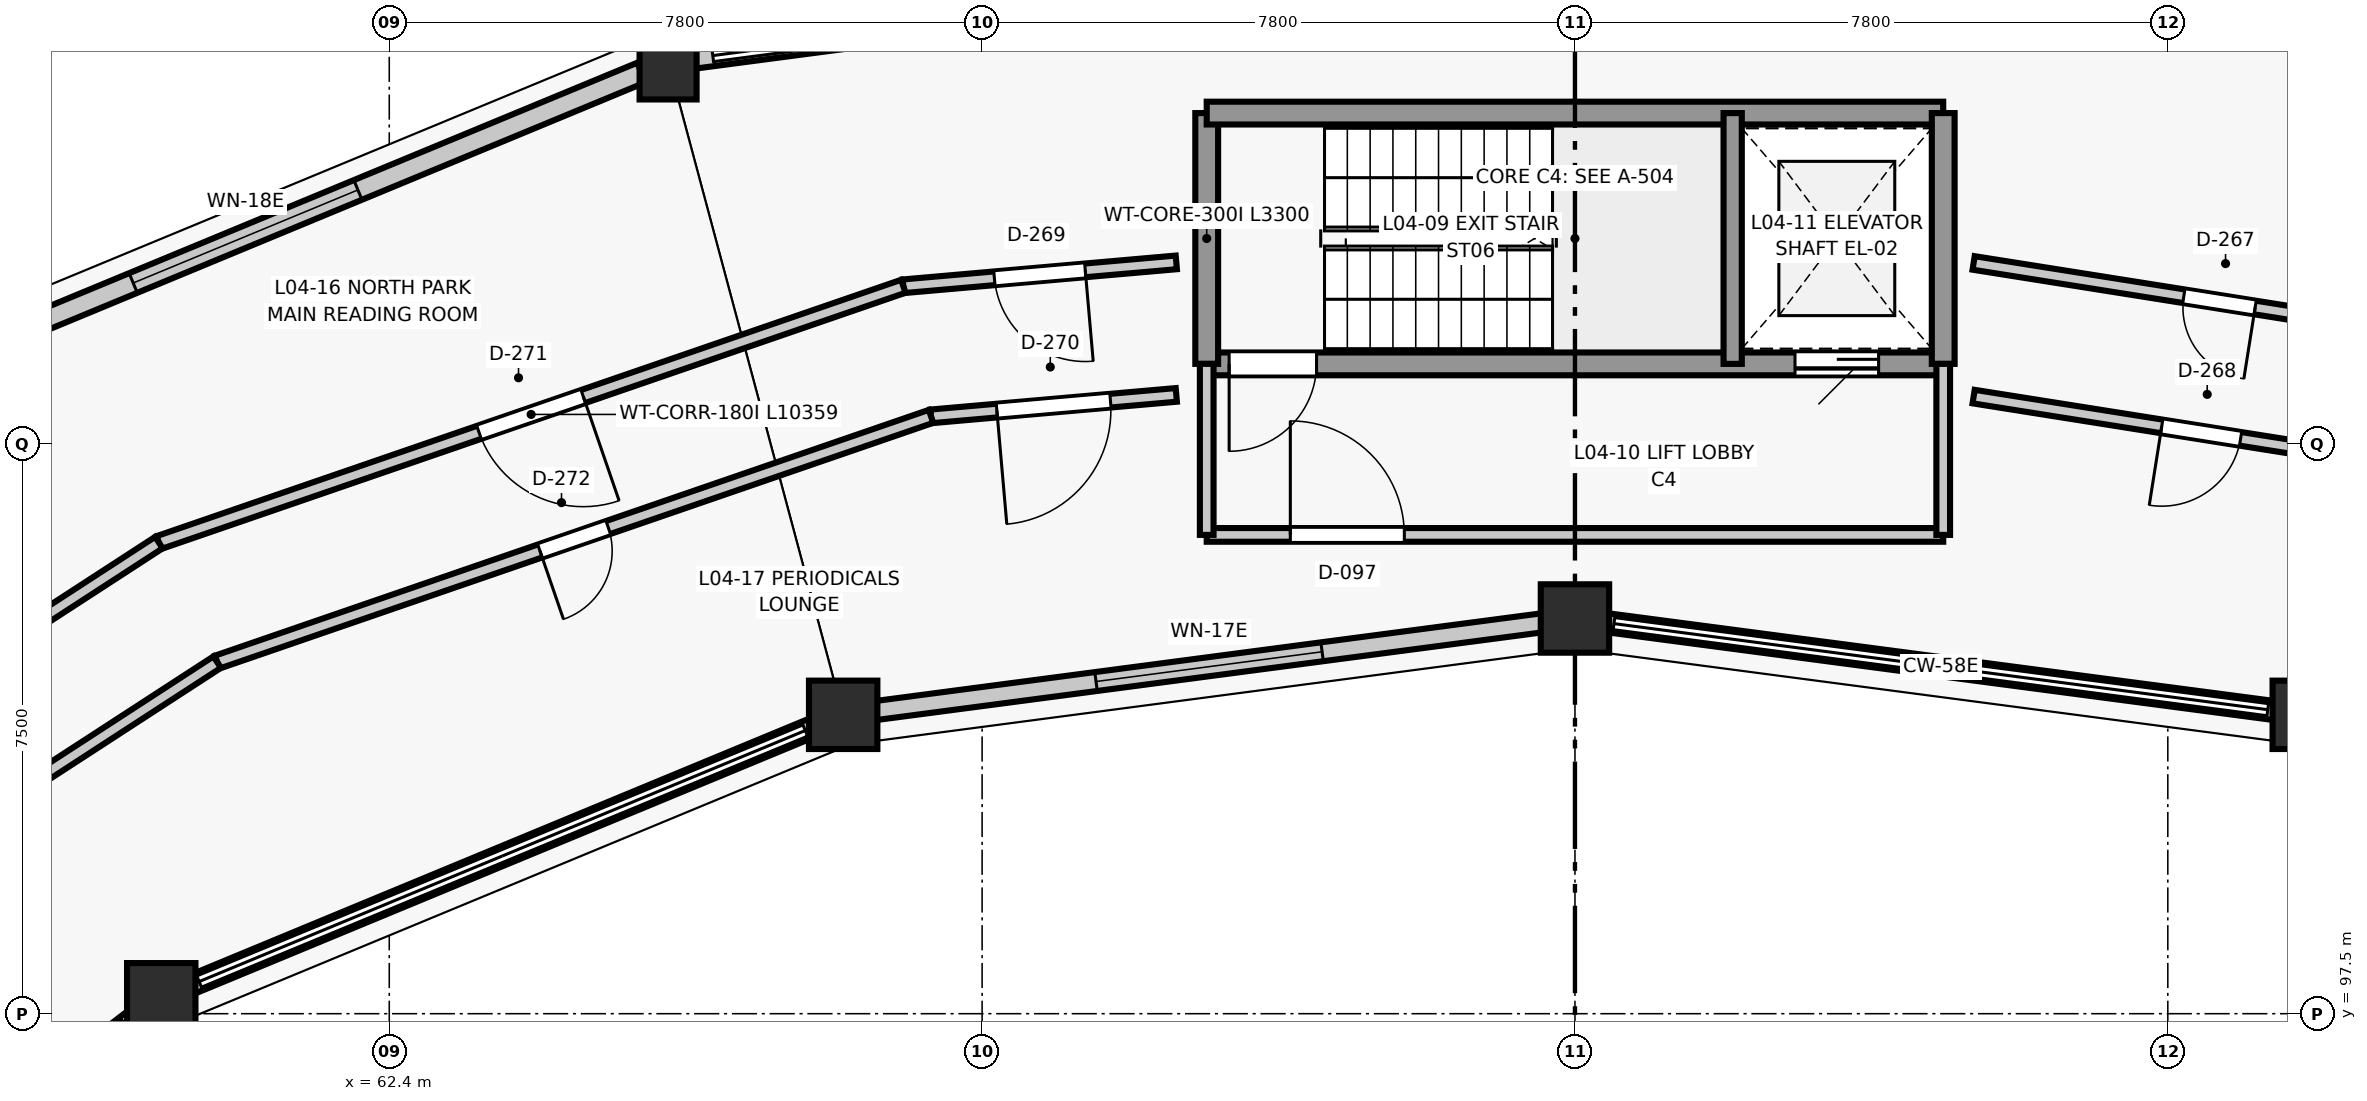
"""IFC4 building model, lengths in metres.
Left out: names, types, materials, properties, quantities, classifications, styles, units other than length and angle.
Written with IfcOpenShell. Run it as: python <this file> out.ifc"""

import sys

from ifc_helpers import new_model, si_unit, direction, frame, frame_2d, origin, origin_2d, place, context, subcontext, project, spatial, rectangle, circle, extrude, element, fill, save


model = new_model("IFC4")
c1 = context("Model", 3, precision=1e-05, world=origin(), true_north=direction((0.0, 1.0)))
c2 = subcontext(c1, "Body", "Model", "MODEL_VIEW")
j1 = project(units=[si_unit("LENGTHUNIT", "METRE"), si_unit("PLANEANGLEUNIT", "RADIAN")], contexts=[c1])
p1 = place(None, origin())
s1 = spatial("IfcSite", under=j1, at=p1, CompositionType="ELEMENT")
p2 = place(p1, origin())
s2 = spatial("IfcBuilding", under=s1, at=p2, CompositionType="ELEMENT")
p3 = place(p2, frame((0.0, 0.0, 16.5)))
s3 = spatial("IfcBuildingStorey", under=s2, at=p3, CompositionType="ELEMENT", Elevation=16.5)
for number, where, z_axis, x_axis in (
    (1, (87.628, 101.432, 0.0), (0.0, 0.0, 1.0), (1.0, 0.0, 0.0)),
    (2, (78.0, 102.7, 0.0), (0.0, 0.0, 1.0), (1.0, 0.0, 0.0)),
    (3, (68.372, 101.432, 0.0), (0.0, 0.0, 1.0), (1.0, 0.0, 0.0)),
    (4, (59.4, 97.716, 0.0), (0.0, 0.0, 1.0), (1.0, 0.0, 0.0)),
):
    element("IfcColumn", number, at=place(p3, frame(where, z_axis=z_axis, x_axis=x_axis)), inside=s3, PredefinedType="COLUMN", context=c2, shape_type="SweptSolid", body=[
        extrude(circle(Radius=0.45, at=origin_2d()), origin(), (0.0, 0.0, 1.0), 3.9),
    ])
p4 = place(p3, frame((66.068, 110.029, 0.0), z_axis=(0.0, 0.0, 1.0), x_axis=(1.0, 0.0, 0.0)))
e5 = element("IfcColumn", 5, at=p4, inside=s3, PredefinedType="COLUMN", context=c2, shape_type="SweptSolid", body=[
    extrude(rectangle(XDim=0.75, YDim=1.0, at=origin_2d()), origin(), (0.0, 0.0, 1.0), 3.9),
])
p5 = place(p3, frame((78.35, 111.554, 0.0), z_axis=(0.0, 0.0, 1.0), x_axis=(0.991443215359, -0.130538694334, 0.0)))
e6 = element("IfcWall", 6, at=p5, inside=s3, PredefinedType="STANDARD", context=c2, shape_type="SweptSolid", body=[
    extrude(rectangle(XDim=11.328, YDim=0.28, at=frame_2d((5.664, 0.0))), origin(), (0.0, 0.0, 1.0), 0.82),
])
p6 = place(p3, frame((87.353, 101.469, 0.0), z_axis=(0.0, 0.0, 1.0), x_axis=(-0.991441766434, 0.130549698469, 0.0)))
e7 = element("IfcWall", 7, at=p6, inside=s3, PredefinedType="STANDARD", context=c2, shape_type="SweptSolid", body=[
    extrude(rectangle(XDim=9.156, YDim=0.25, at=frame_2d((4.578, 0.0))), origin(), (0.0, 0.0, 1.0), 0.82),
])
p7 = place(p3, frame((66.419, 110.075, 0.0), z_axis=(0.0, 0.0, 1.0), x_axis=(0.991443215359, 0.130538694334, 0.0)))
e8 = element("IfcWall", 8, at=p7, inside=s3, PredefinedType="STANDARD", context=c2, shape_type="SweptSolid", body=[
    extrude(rectangle(XDim=11.328, YDim=0.28, at=frame_2d((5.664, 0.0))), origin(), (0.0, 0.0, 1.0), 0.82),
])
p8 = place(p3, frame((77.725, 102.664, 0.0), z_axis=(0.0, 0.0, 1.0), x_axis=(-0.991441766434, -0.130549698469, 0.0)))
e9 = element("IfcWall", 9, at=p8, inside=s3, PredefinedType="STANDARD", context=c2, shape_type="SweptSolid", body=[
    extrude(rectangle(XDim=9.156, YDim=0.25, at=frame_2d((4.578, 0.0))), origin(), (0.0, 0.0, 1.0), 2.929),
])
p9 = place(p8, frame((3.078, 0.0, 0.85)))
e10 = element("IfcOpeningElement", 10, at=p9, cuts=e9, PredefinedType="OPENING", context=c2, shape_type="SweptSolid", body=[
    extrude(rectangle(XDim=3.0, YDim=1.55, at=frame_2d((1.5, 0.775))), frame((0.0, 0.135, 0.0), z_axis=(0.0, -1.0, 0.0), x_axis=(1.0, 0.0, 0.0)), (0.0, 0.0, 1.0), 0.27),
])
p10 = place(p3, frame((55.302, 105.57, 0.0), z_axis=(0.0, 0.0, 1.0), x_axis=(0.923883530636, 0.382673779896, 0.0)))
e11 = element("IfcWall", 11, at=p10, inside=s3, PredefinedType="STANDARD", context=c2, shape_type="SweptSolid", body=[
    extrude(rectangle(XDim=11.272, YDim=0.28, at=frame_2d((5.636, 0.0))), origin(), (0.0, 0.0, 1.0), 2.846),
])
p11 = place(p10, frame((4.036, 0.0, 0.85)))
e12 = element("IfcOpeningElement", 12, at=p11, cuts=e11, PredefinedType="OPENING", context=c2, shape_type="SweptSolid", body=[
    extrude(rectangle(XDim=3.2, YDim=1.55, at=frame_2d((1.6, 0.775))), frame((0.0, 0.15, 0.0), z_axis=(0.0, -1.0, 0.0), x_axis=(1.0, 0.0, 0.0)), (0.0, 0.0, 1.0), 0.3),
])
p12 = place(p3, frame((68.095, 101.318, 0.0), z_axis=(0.0, 0.0, 1.0), x_axis=(-0.923880324771, -0.382681519675, 0.0)))
e13 = element("IfcWall", 13, at=p12, inside=s3, PredefinedType="STANDARD", context=c2, shape_type="SweptSolid", body=[
    extrude(rectangle(XDim=9.112, YDim=0.25, at=frame_2d((4.556, 0.0))), origin(), (0.0, 0.0, 1.0), 0.82),
])
p13 = place(p3, frame((59.12, 97.501, 0.0), z_axis=(0.0, 0.0, 1.0), x_axis=(-0.793347085527, -0.608769580289, 0.0)))
e14 = element("IfcWall", 14, at=p13, inside=s3, PredefinedType="STANDARD", context=c2, shape_type="SweptSolid", body=[
    extrude(rectangle(XDim=9.005, YDim=0.25, at=frame_2d((4.502, 0.0))), origin(), (0.0, 0.0, 1.0), 0.82),
])
p14 = place(p3, frame((82.845, 106.05, 0.0), z_axis=(0.0, 0.0, 1.0), x_axis=(-1.0, 0.0, 0.0)))
e15 = element("IfcWall", 15, at=p14, inside=s3, PredefinedType="SHEAR", context=c2, shape_type="SweptSolid", body=[
    extrude(rectangle(XDim=9.69, YDim=0.3, at=frame_2d((4.845, 0.0))), origin(), (0.0, 0.0, 1.0), 3.9),
])
p15 = place(p14, frame((8.245, 0.0, 0.0)))
e16 = element("IfcOpeningElement", 16, at=p15, cuts=e15, PredefinedType="OPENING", context=c2, shape_type="SweptSolid", body=[
    extrude(rectangle(XDim=1.15, YDim=2.15, at=frame_2d((0.575, 1.075))), frame((0.0, 0.16, 0.0), z_axis=(0.0, -1.0, 0.0), x_axis=(1.0, 0.0, 0.0)), (0.0, 0.0, 1.0), 0.32),
])
p16 = place(p14, frame((0.85, 0.0, 0.0)))
e17 = element("IfcOpeningElement", 17, at=p16, cuts=e15, PredefinedType="OPENING", context=c2, shape_type="SweptSolid", body=[
    extrude(rectangle(XDim=1.1, YDim=2.15, at=frame_2d((0.55, 1.075))), frame((0.0, 0.16, 0.0), z_axis=(0.0, -1.0, 0.0), x_axis=(1.0, 0.0, 0.0)), (0.0, 0.0, 1.0), 0.32),
])
p17 = place(p3, frame((73.155, 106.05, 0.0), z_axis=(0.0, 0.0, 1.0), x_axis=(0.0, 1.0, 0.0)))
e18 = element("IfcWall", 18, at=p17, inside=s3, PredefinedType="SHEAR", context=c2, shape_type="SweptSolid", body=[
    extrude(rectangle(XDim=3.3, YDim=0.3, at=frame_2d((1.65, 0.0))), origin(), (0.0, 0.0, 1.0), 3.9),
])
p18 = place(p3, frame((73.155, 109.35, 0.0), z_axis=(0.0, 0.0, 1.0), x_axis=(1.0, 0.0, 0.0)))
e19 = element("IfcWall", 19, at=p18, inside=s3, PredefinedType="SHEAR", context=c2, shape_type="SweptSolid", body=[
    extrude(rectangle(XDim=9.69, YDim=0.3, at=frame_2d((4.845, 0.0))), origin(), (0.0, 0.0, 1.0), 3.9),
])
p19 = place(p3, frame((82.845, 109.35, 0.0), z_axis=(0.0, 0.0, 1.0), x_axis=(0.0, -1.0, 0.0)))
e20 = element("IfcWall", 20, at=p19, inside=s3, PredefinedType="SHEAR", context=c2, shape_type="SweptSolid", body=[
    extrude(rectangle(XDim=3.3, YDim=0.3, at=frame_2d((1.65, 0.0))), origin(), (0.0, 0.0, 1.0), 3.9),
])
p20 = place(p3, frame((80.075, 106.05, 0.0), z_axis=(0.0, 0.0, 1.0), x_axis=(0.0, 1.0, 0.0)))
e21 = element("IfcWall", 21, at=p20, inside=s3, PredefinedType="SHEAR", context=c2, shape_type="SweptSolid", body=[
    extrude(rectangle(XDim=3.3, YDim=0.24, at=frame_2d((1.65, 0.0))), origin(), (0.0, 0.0, 1.0), 3.9),
])
p21 = place(p3, frame((73.155, 103.8, 0.0), z_axis=(0.0, 0.0, 1.0), x_axis=(1.0, 0.0, 0.0)))
e22 = element("IfcWall", 22, at=p21, inside=s3, PredefinedType="PARTITIONING", context=c2, shape_type="SweptSolid", body=[
    extrude(rectangle(XDim=9.69, YDim=0.18, at=frame_2d((4.845, 0.0))), origin(), (0.0, 0.0, 1.0), 3.635),
])
p22 = place(p21, frame((1.1, 0.0, 0.0)))
e23 = element("IfcOpeningElement", 23, at=p22, cuts=e22, PredefinedType="OPENING", context=c2, shape_type="SweptSolid", body=[
    extrude(rectangle(XDim=1.5, YDim=2.15, at=frame_2d((0.75, 1.075))), frame((0.0, 0.1, 0.0), z_axis=(0.0, -1.0, 0.0), x_axis=(1.0, 0.0, 0.0)), (0.0, 0.0, 1.0), 0.2),
])
for number, where, z_axis, x_axis in (
    (24, (73.155, 106.05, 0.0), (0.0, 0.0, 1.0), (0.0, -1.0, 0.0)),
    (25, (82.845, 106.05, 0.0), (0.0, 0.0, 1.0), (0.0, -1.0, 0.0)),
):
    element("IfcWall", number, at=place(p3, frame(where, z_axis=z_axis, x_axis=x_axis)), inside=s3, PredefinedType="PARTITIONING", context=c2, shape_type="SweptSolid", body=[
        extrude(rectangle(XDim=2.25, YDim=0.18, at=frame_2d((1.125, 0.0))), origin(), (0.0, 0.0, 1.0), 3.635),
    ])
p23 = place(p3, frame((89.715, 106.354, 0.0), z_axis=(0.0, 0.0, 1.0), x_axis=(-0.987682749699, 0.15646976049, 0.0)))
e26 = element("IfcWall", 26, at=p23, inside=s3, PredefinedType="PARTITIONING", context=c2, shape_type="SweptSolid", body=[
    extrude(rectangle(XDim=6.55, YDim=0.18, at=frame_2d((3.275, 0.0))), origin(), (0.0, 0.0, 1.0), 3.635),
])
p24 = place(p23, frame((2.8, 0.0, 0.0)))
e27 = element("IfcOpeningElement", 27, at=p24, cuts=e26, PredefinedType="OPENING", context=c2, shape_type="SweptSolid", body=[
    extrude(rectangle(XDim=0.95, YDim=2.1, at=frame_2d((0.475, 1.05))), frame((0.0, 0.1, 0.0), z_axis=(0.0, -1.0, 0.0), x_axis=(1.0, 0.0, 0.0)), (0.0, 0.0, 1.0), 0.2),
])
p25 = place(p3, frame((89.232, 104.671, 0.0), z_axis=(0.0, 0.0, 1.0), x_axis=(-0.987688724115, 0.15643204357, 0.0)))
e28 = element("IfcWall", 28, at=p25, inside=s3, PredefinedType="PARTITIONING", context=c2, shape_type="SweptSolid", body=[
    extrude(rectangle(XDim=6.062, YDim=0.18, at=frame_2d((3.031, 0.0))), origin(), (0.0, 0.0, 1.0), 3.635),
])
p26 = place(p25, frame((2.506, 0.0, 0.0)))
e29 = element("IfcOpeningElement", 29, at=p26, cuts=e28, PredefinedType="OPENING", context=c2, shape_type="SweptSolid", body=[
    extrude(rectangle(XDim=1.05, YDim=2.1, at=frame_2d((0.525, 1.05))), frame((0.0, 0.1, 0.0), z_axis=(0.0, -1.0, 0.0), x_axis=(1.0, 0.0, 0.0)), (0.0, 0.0, 1.0), 0.2),
])
p27 = place(p3, frame((72.755, 107.385, 0.0), z_axis=(0.0, 0.0, 1.0), x_axis=(-0.996193938033, -0.087164429822, 0.0)))
e30 = element("IfcWall", 30, at=p27, inside=s3, PredefinedType="PARTITIONING", context=c2, shape_type="SweptSolid", body=[
    extrude(rectangle(XDim=3.605, YDim=0.18, at=frame_2d((1.802, 0.0))), origin(), (0.0, 0.0, 1.0), 3.635),
])
p28 = place(p27, frame((1.202, 0.0, 0.0)))
e31 = element("IfcOpeningElement", 31, at=p28, cuts=e30, PredefinedType="OPENING", context=c2, shape_type="SweptSolid", body=[
    extrude(rectangle(XDim=1.2, YDim=2.15, at=frame_2d((0.6, 1.075))), frame((0.0, 0.1, 0.0), z_axis=(0.0, -1.0, 0.0), x_axis=(1.0, 0.0, 0.0)), (0.0, 0.0, 1.0), 0.2),
])
p29 = place(p3, frame((72.755, 105.642, 0.0), z_axis=(0.0, 0.0, 1.0), x_axis=(-0.996198051658, -0.087117402808, 0.0)))
e32 = element("IfcWall", 32, at=p29, inside=s3, PredefinedType="PARTITIONING", context=c2, shape_type="SweptSolid", body=[
    extrude(rectangle(XDim=3.24, YDim=0.18, at=frame_2d((1.62, 0.0))), origin(), (0.0, 0.0, 1.0), 3.635),
])
p30 = place(p29, frame((0.87, 0.0, 0.0)))
e33 = element("IfcOpeningElement", 33, at=p30, cuts=e32, PredefinedType="OPENING", context=c2, shape_type="SweptSolid", body=[
    extrude(rectangle(XDim=1.5, YDim=2.15, at=frame_2d((0.75, 1.075))), frame((0.0, 0.1, 0.0), z_axis=(0.0, -1.0, 0.0), x_axis=(1.0, 0.0, 0.0)), (0.0, 0.0, 1.0), 0.2),
])
p31 = place(p3, frame((69.164, 107.071, 0.0), z_axis=(0.0, 0.0, 1.0), x_axis=(-0.945519152491, -0.325566479038, 0.0)))
e34 = element("IfcWall", 34, at=p31, inside=s3, PredefinedType="PARTITIONING", context=c2, shape_type="SweptSolid", body=[
    extrude(rectangle(XDim=10.359, YDim=0.18, at=frame_2d((5.18, 0.0))), origin(), (0.0, 0.0, 1.0), 3.635),
])
p32 = place(p31, frame((4.455, 0.0, 0.0)))
e35 = element("IfcOpeningElement", 35, at=p32, cuts=e34, PredefinedType="OPENING", context=c2, shape_type="SweptSolid", body=[
    extrude(rectangle(XDim=1.45, YDim=2.2, at=frame_2d((0.725, 1.1))), frame((0.0, 0.1, 0.0), z_axis=(0.0, -1.0, 0.0), x_axis=(1.0, 0.0, 0.0)), (0.0, 0.0, 1.0), 0.2),
])
p33 = place(p3, frame((69.528, 105.36, 0.0), z_axis=(0.0, 0.0, 1.0), x_axis=(-0.945517864124, -0.325570220723, 0.0)))
e36 = element("IfcWall", 36, at=p33, inside=s3, PredefinedType="PARTITIONING", context=c2, shape_type="SweptSolid", body=[
    extrude(rectangle(XDim=9.932, YDim=0.18, at=frame_2d((4.966, 0.0))), origin(), (0.0, 0.0, 1.0), 3.635),
])
p34 = place(p33, frame((4.491, 0.0, 0.0)))
e37 = element("IfcOpeningElement", 37, at=p34, cuts=e36, PredefinedType="OPENING", context=c2, shape_type="SweptSolid", body=[
    extrude(rectangle(XDim=0.95, YDim=2.1, at=frame_2d((0.475, 1.05))), frame((0.0, 0.1, 0.0), z_axis=(0.0, -1.0, 0.0), x_axis=(1.0, 0.0, 0.0)), (0.0, 0.0, 1.0), 0.2),
])
p35 = place(p3, frame((59.369, 103.699, 0.0), z_axis=(0.0, 0.0, 1.0), x_axis=(-0.838672389469, -0.544636230104, 0.0)))
e38 = element("IfcWall", 38, at=p35, inside=s3, PredefinedType="PARTITIONING", context=c2, shape_type="SweptSolid", body=[
    extrude(rectangle(XDim=10.359, YDim=0.18, at=frame_2d((5.179, 0.0))), origin(), (0.0, 0.0, 1.0), 3.635),
])
p36 = place(p35, frame((4.654, 0.0, 0.0)))
e39 = element("IfcOpeningElement", 39, at=p36, cuts=e38, PredefinedType="OPENING", context=c2, shape_type="SweptSolid", body=[
    extrude(rectangle(XDim=1.05, YDim=2.1, at=frame_2d((0.525, 1.05))), frame((0.0, 0.1, 0.0), z_axis=(0.0, -1.0, 0.0), x_axis=(1.0, 0.0, 0.0)), (0.0, 0.0, 1.0), 0.2),
])
p37 = place(p3, frame((60.136, 102.126, 0.0), z_axis=(0.0, 0.0, 1.0), x_axis=(-0.838668177387, -0.544642716135, 0.0)))
e40 = element("IfcWall", 40, at=p37, inside=s3, PredefinedType="PARTITIONING", context=c2, shape_type="SweptSolid", body=[
    extrude(rectangle(XDim=9.933, YDim=0.18, at=frame_2d((4.966, 0.0))), origin(), (0.0, 0.0, 1.0), 3.635),
])
p38 = place(p37, frame((4.366, 0.0, 0.0)))
e41 = element("IfcOpeningElement", 41, at=p38, cuts=e40, PredefinedType="OPENING", context=c2, shape_type="SweptSolid", body=[
    extrude(rectangle(XDim=1.2, YDim=2.15, at=frame_2d((0.6, 1.075))), frame((0.0, 0.1, 0.0), z_axis=(0.0, -1.0, 0.0), x_axis=(1.0, 0.0, 0.0)), (0.0, 0.0, 1.0), 0.2),
])
p39 = place(p9, origin())
e42 = element("IfcWindow", 42, at=p39, inside=s3, PartitioningType="SINGLE_PANEL", PredefinedType="WINDOW", context=c2, shape_type="SweptSolid", body=[
    extrude(rectangle(XDim=3.0, YDim=1.55, at=frame_2d((1.5, 0.775))), frame((0.0, 0.03, 0.0), z_axis=(0.0, -1.0, 0.0), x_axis=(1.0, 0.0, 0.0)), (0.0, 0.0, 1.0), 0.06),
])
fill(e10, e42)
p40 = place(p11, origin())
e43 = element("IfcWindow", 43, at=p40, inside=s3, PartitioningType="SINGLE_PANEL", PredefinedType="WINDOW", context=c2, shape_type="SweptSolid", body=[
    extrude(rectangle(XDim=3.2, YDim=1.55, at=frame_2d((1.6, 0.775))), frame((0.0, 0.03, 0.0), z_axis=(0.0, -1.0, 0.0), x_axis=(1.0, 0.0, 0.0)), (0.0, 0.0, 1.0), 0.06),
])
fill(e12, e43)
p41 = place(p15, origin())
e44 = element("IfcDoor", 44, at=p41, inside=s3, OperationType="SINGLE_SWING_RIGHT", PredefinedType="DOOR", context=c2, shape_type="SweptSolid", body=[
    extrude(rectangle(XDim=1.15, YDim=2.15, at=frame_2d((0.575, 1.075))), frame((0.0, 0.025, 0.0), z_axis=(0.0, -1.0, 0.0), x_axis=(1.0, 0.0, 0.0)), (0.0, 0.0, 1.0), 0.05),
])
fill(e16, e44)
p42 = place(p16, origin())
e45 = element("IfcDoor", 45, at=p42, inside=s3, OperationType="SLIDING_TO_LEFT", PredefinedType="DOOR", context=c2, shape_type="SweptSolid", body=[
    extrude(rectangle(XDim=1.1, YDim=2.15, at=frame_2d((0.55, 1.075))), frame((0.0, 0.025, 0.0), z_axis=(0.0, -1.0, 0.0), x_axis=(1.0, 0.0, 0.0)), (0.0, 0.0, 1.0), 0.05),
])
fill(e17, e45)
p43 = place(p22, origin())
e46 = element("IfcDoor", 46, at=p43, inside=s3, OperationType="SINGLE_SWING_LEFT", PredefinedType="DOOR", context=c2, shape_type="SweptSolid", body=[
    extrude(rectangle(XDim=1.5, YDim=2.15, at=frame_2d((0.75, 1.075))), frame((0.0, 0.025, 0.0), z_axis=(0.0, -1.0, 0.0), x_axis=(1.0, 0.0, 0.0)), (0.0, 0.0, 1.0), 0.05),
])
fill(e23, e46)
p44 = place(p24, origin())
e47 = element("IfcDoor", 47, at=p44, inside=s3, OperationType="SINGLE_SWING_LEFT", PredefinedType="DOOR", context=c2, shape_type="SweptSolid", body=[
    extrude(rectangle(XDim=0.95, YDim=2.1, at=frame_2d((0.475, 1.05))), frame((0.0, 0.025, 0.0), z_axis=(0.0, -1.0, 0.0), x_axis=(1.0, 0.0, 0.0)), (0.0, 0.0, 1.0), 0.05),
])
fill(e27, e47)
p45 = place(p26, origin())
e48 = element("IfcDoor", 48, at=p45, inside=s3, OperationType="SINGLE_SWING_RIGHT", PredefinedType="DOOR", context=c2, shape_type="SweptSolid", body=[
    extrude(rectangle(XDim=1.05, YDim=2.1, at=frame_2d((0.525, 1.05))), frame((0.0, 0.025, 0.0), z_axis=(0.0, -1.0, 0.0), x_axis=(1.0, 0.0, 0.0)), (0.0, 0.0, 1.0), 0.05),
])
fill(e29, e48)
p46 = place(p28, origin())
e49 = element("IfcDoor", 49, at=p46, inside=s3, OperationType="SINGLE_SWING_LEFT", PredefinedType="DOOR", context=c2, shape_type="SweptSolid", body=[
    extrude(rectangle(XDim=1.2, YDim=2.15, at=frame_2d((0.6, 1.075))), frame((0.0, 0.025, 0.0), z_axis=(0.0, -1.0, 0.0), x_axis=(1.0, 0.0, 0.0)), (0.0, 0.0, 1.0), 0.05),
])
fill(e31, e49)
p47 = place(p30, origin())
e50 = element("IfcDoor", 50, at=p47, inside=s3, OperationType="SINGLE_SWING_RIGHT", PredefinedType="DOOR", context=c2, shape_type="SweptSolid", body=[
    extrude(rectangle(XDim=1.5, YDim=2.15, at=frame_2d((0.75, 1.075))), frame((0.0, 0.025, 0.0), z_axis=(0.0, -1.0, 0.0), x_axis=(1.0, 0.0, 0.0)), (0.0, 0.0, 1.0), 0.05),
])
fill(e33, e50)
p48 = place(p32, origin())
e51 = element("IfcDoor", 51, at=p48, inside=s3, OperationType="SINGLE_SWING_LEFT", PredefinedType="DOOR", context=c2, shape_type="SweptSolid", body=[
    extrude(rectangle(XDim=1.45, YDim=2.2, at=frame_2d((0.725, 1.1))), frame((0.0, 0.025, 0.0), z_axis=(0.0, -1.0, 0.0), x_axis=(1.0, 0.0, 0.0)), (0.0, 0.0, 1.0), 0.05),
])
fill(e35, e51)
p49 = place(p34, origin())
e52 = element("IfcDoor", 52, at=p49, inside=s3, OperationType="SINGLE_SWING_RIGHT", PredefinedType="DOOR", context=c2, shape_type="SweptSolid", body=[
    extrude(rectangle(XDim=0.95, YDim=2.1, at=frame_2d((0.475, 1.05))), frame((0.0, 0.025, 0.0), z_axis=(0.0, -1.0, 0.0), x_axis=(1.0, 0.0, 0.0)), (0.0, 0.0, 1.0), 0.05),
])
fill(e37, e52)
save(model, sys.argv[1])
